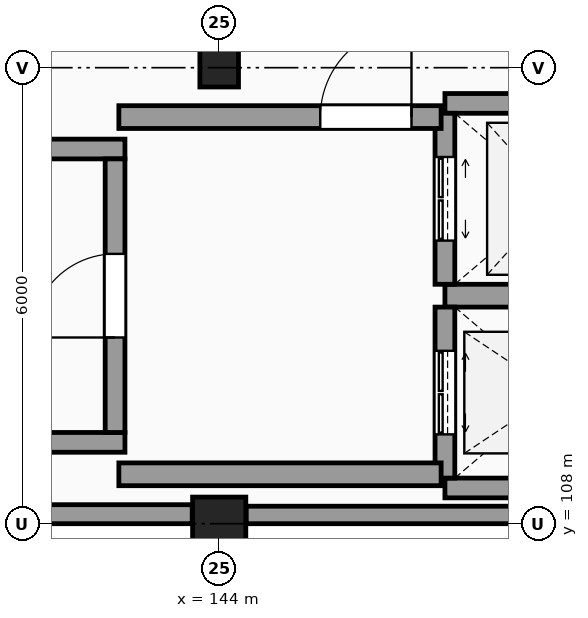
"""IFC4 building model, lengths in metres.
Left out: names, types, materials, properties, quantities, classifications, styles, units other than length and angle.
Written with IfcOpenShell. Run it as: python <this file> out.ifc"""

import sys

from ifc_helpers import new_model, si_unit, direction, frame, frame_2d, origin, origin_2d, place, context, subcontext, project, spatial, rectangle, circle, hollow_circle, extrude, element, fill, save


model = new_model("IFC4")
c1 = context("Model", 3, precision=1e-05, world=origin(), true_north=direction((0.0, 1.0)))
c2 = subcontext(c1, "Body", "Model", "MODEL_VIEW")
j1 = project(units=[si_unit("LENGTHUNIT", "METRE"), si_unit("PLANEANGLEUNIT", "RADIAN")], contexts=[c1])
p1 = place(None, origin())
s1 = spatial("IfcSite", under=j1, at=p1, CompositionType="ELEMENT")
p2 = place(p1, origin())
s2 = spatial("IfcBuilding", under=s1, at=p2, CompositionType="ELEMENT")
p3 = place(p2, frame((0.0, 0.0, 10.5)))
s3 = spatial("IfcBuildingStorey", under=s2, at=p3, CompositionType="ELEMENT", Elevation=10.5)
p4 = place(p3, frame((144.0, 108.0, 0.0), z_axis=(0.0, 0.0, 1.0), x_axis=(1.0, 0.0, 0.0)))
e1 = element("IfcColumn", 1, at=p4, inside=s3, PredefinedType="COLUMN", context=c2, shape_type="SweptSolid", body=[
    extrude(circle(Radius=0.35, at=origin_2d()), origin(), (0.0, 0.0, 1.0), 4.5),
])
p5 = place(p3, frame((144.0, 114.0, 0.0), z_axis=(0.0, 0.0, 1.0), x_axis=(1.0, 0.0, 0.0)))
e2 = element("IfcColumn", 2, at=p5, inside=s3, PredefinedType="COLUMN", context=c2, shape_type="SweptSolid", body=[
    extrude(hollow_circle(Radius=0.254, WallThickness=0.025, at=origin_2d()), origin(), (0.0, 0.0, 1.0), 4.5),
])
p6 = place(p3, frame((138.33, 108.125, 0.0), z_axis=(0.0, 0.0, 1.0), x_axis=(1.0, 0.0, 0.0)))
e3 = element("IfcWall", 3, at=p6, inside=s3, PredefinedType="SOLIDWALL", context=c2, shape_type="SweptSolid", body=[
    extrude(rectangle(XDim=5.315, YDim=0.25, at=frame_2d((2.657, 0.0))), origin(), (0.0, 0.0, 1.0), 3.49),
])
p7 = place(p3, frame((144.355, 108.115, 0.0), z_axis=(0.0, 0.0, 1.0), x_axis=(1.0, 0.0, 0.0)))
e4 = element("IfcWall", 4, at=p7, inside=s3, PredefinedType="SOLIDWALL", context=c2, shape_type="SweptSolid", body=[
    extrude(rectangle(XDim=5.386, YDim=0.23, at=frame_2d((2.693, 0.0))), origin(), (0.0, 0.0, 1.0), 3.49),
])
for number, where, z_axis, x_axis in (
    (5, (132.04, 109.07, 0.0), (0.0, 0.0, 1.0), (1.0, 0.0, 0.0)),
    (6, (132.04, 112.93, 0.0), (0.0, 0.0, 1.0), (1.0, 0.0, 0.0)),
):
    element("IfcWall", number, at=place(p3, frame(where, z_axis=z_axis, x_axis=x_axis)), inside=s3, PredefinedType="SHEAR", context=c2, shape_type="SweptSolid", body=[
        extrude(rectangle(XDim=10.72, YDim=0.26, at=frame_2d((5.36, 0.0))), origin(), (0.0, 0.0, 1.0), 4.5),
    ])
p8 = place(p3, frame((142.63, 109.2, 0.0), z_axis=(0.0, 0.0, 1.0), x_axis=(0.0, 1.0, 0.0)))
e7 = element("IfcWall", 7, at=p8, inside=s3, PredefinedType="SHEAR", context=c2, shape_type="SweptSolid", body=[
    extrude(rectangle(XDim=3.6, YDim=0.26, at=frame_2d((1.8, 0.0))), origin(), (0.0, 0.0, 1.0), 4.5),
])
p9 = place(p8, frame((1.25, 0.0, 0.0)))
e8 = element("IfcOpeningElement", 8, at=p9, cuts=e7, PredefinedType="OPENING", context=c2, shape_type="SweptSolid", body=[
    extrude(rectangle(XDim=1.1, YDim=2.15, at=frame_2d((0.55, 1.075))), frame((0.0, 0.14, 0.0), z_axis=(0.0, -1.0, 0.0), x_axis=(1.0, 0.0, 0.0)), (0.0, 0.0, 1.0), 0.28),
])
p10 = place(p3, frame((146.97, 108.47, 0.0), z_axis=(0.0, 0.0, 1.0), x_axis=(1.0, 0.0, 0.0)))
e9 = element("IfcWall", 9, at=p10, inside=s3, PredefinedType="SHEAR", context=c2, shape_type="SweptSolid", body=[
    extrude(rectangle(XDim=2.91, YDim=0.26, at=frame_2d((1.455, 0.0))), origin(), (0.0, 0.0, 1.0), 4.5),
])
p11 = place(p3, frame((146.97, 111.0, 0.0), z_axis=(0.0, 0.0, 1.0), x_axis=(1.0, 0.0, 0.0)))
e10 = element("IfcWall", 10, at=p11, inside=s3, PredefinedType="SHEAR", context=c2, shape_type="SweptSolid", body=[
    extrude(rectangle(XDim=2.91, YDim=0.3, at=frame_2d((1.455, 0.0))), origin(), (0.0, 0.0, 1.0), 4.5),
])
p12 = place(p3, frame((146.97, 108.6, 0.0), z_axis=(0.0, 0.0, 1.0), x_axis=(0.0, 1.0, 0.0)))
e11 = element("IfcWall", 11, at=p12, inside=s3, PredefinedType="SHEAR", context=c2, shape_type="SweptSolid", body=[
    extrude(rectangle(XDim=2.25, YDim=0.26, at=frame_2d((1.125, 0.0))), origin(), (0.0, 0.0, 1.0), 4.5),
])
p13 = place(p12, frame((0.575, 0.0, 0.0)))
e12 = element("IfcOpeningElement", 12, at=p13, cuts=e11, PredefinedType="OPENING", context=c2, shape_type="SweptSolid", body=[
    extrude(rectangle(XDim=1.1, YDim=2.2, at=frame_2d((0.55, 1.1))), frame((0.0, 0.14, 0.0), z_axis=(0.0, -1.0, 0.0), x_axis=(1.0, 0.0, 0.0)), (0.0, 0.0, 1.0), 0.28),
])
p14 = place(p3, frame((146.97, 113.53, 0.0), z_axis=(0.0, 0.0, 1.0), x_axis=(1.0, 0.0, 0.0)))
e13 = element("IfcWall", 13, at=p14, inside=s3, PredefinedType="SHEAR", context=c2, shape_type="SweptSolid", body=[
    extrude(rectangle(XDim=2.91, YDim=0.26, at=frame_2d((1.455, 0.0))), origin(), (0.0, 0.0, 1.0), 4.5),
])
p15 = place(p3, frame((146.97, 111.15, 0.0), z_axis=(0.0, 0.0, 1.0), x_axis=(0.0, 1.0, 0.0)))
e14 = element("IfcWall", 14, at=p15, inside=s3, PredefinedType="SHEAR", context=c2, shape_type="SweptSolid", body=[
    extrude(rectangle(XDim=2.25, YDim=0.26, at=frame_2d((1.125, 0.0))), origin(), (0.0, 0.0, 1.0), 4.5),
])
p16 = place(p15, frame((0.575, 0.0, 0.0)))
e15 = element("IfcOpeningElement", 15, at=p16, cuts=e14, PredefinedType="OPENING", context=c2, shape_type="SweptSolid", body=[
    extrude(rectangle(XDim=1.1, YDim=2.2, at=frame_2d((0.55, 1.1))), frame((0.0, 0.14, 0.0), z_axis=(0.0, -1.0, 0.0), x_axis=(1.0, 0.0, 0.0)), (0.0, 0.0, 1.0), 0.28),
])
p17 = place(p3, frame((142.68, 113.35, 0.0), z_axis=(0.0, 0.0, 1.0), x_axis=(1.0, 0.0, 0.0)))
e16 = element("IfcWall", 16, at=p17, inside=s3, PredefinedType="SHEAR", context=c2, shape_type="SweptSolid", body=[
    extrude(rectangle(XDim=4.24, YDim=0.3, at=frame_2d((2.12, 0.0))), origin(), (0.0, 0.0, 1.0), 4.5),
])
p18 = place(p17, frame((2.65, 0.0, 0.0)))
e17 = element("IfcOpeningElement", 17, at=p18, cuts=e16, PredefinedType="OPENING", context=c2, shape_type="SweptSolid", body=[
    extrude(rectangle(XDim=1.2, YDim=2.2, at=frame_2d((0.6, 1.1))), frame((0.0, 0.16, 0.0), z_axis=(0.0, -1.0, 0.0), x_axis=(1.0, 0.0, 0.0)), (0.0, 0.0, 1.0), 0.32),
])
p19 = place(p3, frame((142.68, 108.65, 0.0), z_axis=(0.0, 0.0, 1.0), x_axis=(1.0, 0.0, 0.0)))
e18 = element("IfcWall", 18, at=p19, inside=s3, PredefinedType="SHEAR", context=c2, shape_type="SweptSolid", body=[
    extrude(rectangle(XDim=4.24, YDim=0.3, at=frame_2d((2.12, 0.0))), origin(), (0.0, 0.0, 1.0), 4.5),
])
p20 = place(p9, origin())
e19 = element("IfcDoor", 19, at=p20, inside=s3, OperationType="SINGLE_SWING_LEFT", PredefinedType="DOOR", context=c2, shape_type="SweptSolid", body=[
    extrude(rectangle(XDim=1.1, YDim=2.15, at=frame_2d((0.55, 1.075))), frame((0.0, 0.025, 0.0), z_axis=(0.0, -1.0, 0.0), x_axis=(1.0, 0.0, 0.0)), (0.0, 0.0, 1.0), 0.05),
])
fill(e8, e19)
p21 = place(p13, origin())
e20 = element("IfcDoor", 20, at=p21, inside=s3, OperationType="DOUBLE_DOOR_SLIDING", PredefinedType="DOOR", context=c2, shape_type="SweptSolid", body=[
    extrude(rectangle(XDim=1.1, YDim=2.2, at=frame_2d((0.55, 1.1))), frame((0.0, 0.025, 0.0), z_axis=(0.0, -1.0, 0.0), x_axis=(1.0, 0.0, 0.0)), (0.0, 0.0, 1.0), 0.05),
])
fill(e12, e20)
p22 = place(p16, origin())
e21 = element("IfcDoor", 21, at=p22, inside=s3, OperationType="DOUBLE_DOOR_SLIDING", PredefinedType="DOOR", context=c2, shape_type="SweptSolid", body=[
    extrude(rectangle(XDim=1.1, YDim=2.2, at=frame_2d((0.55, 1.1))), frame((0.0, 0.025, 0.0), z_axis=(0.0, -1.0, 0.0), x_axis=(1.0, 0.0, 0.0)), (0.0, 0.0, 1.0), 0.05),
])
fill(e15, e21)
p23 = place(p18, origin())
e22 = element("IfcDoor", 22, at=p23, inside=s3, OperationType="SINGLE_SWING_RIGHT", PredefinedType="DOOR", context=c2, shape_type="SweptSolid", body=[
    extrude(rectangle(XDim=1.2, YDim=2.2, at=frame_2d((0.6, 1.1))), frame((0.0, 0.025, 0.0), z_axis=(0.0, -1.0, 0.0), x_axis=(1.0, 0.0, 0.0)), (0.0, 0.0, 1.0), 0.05),
])
fill(e17, e22)
save(model, sys.argv[1])
